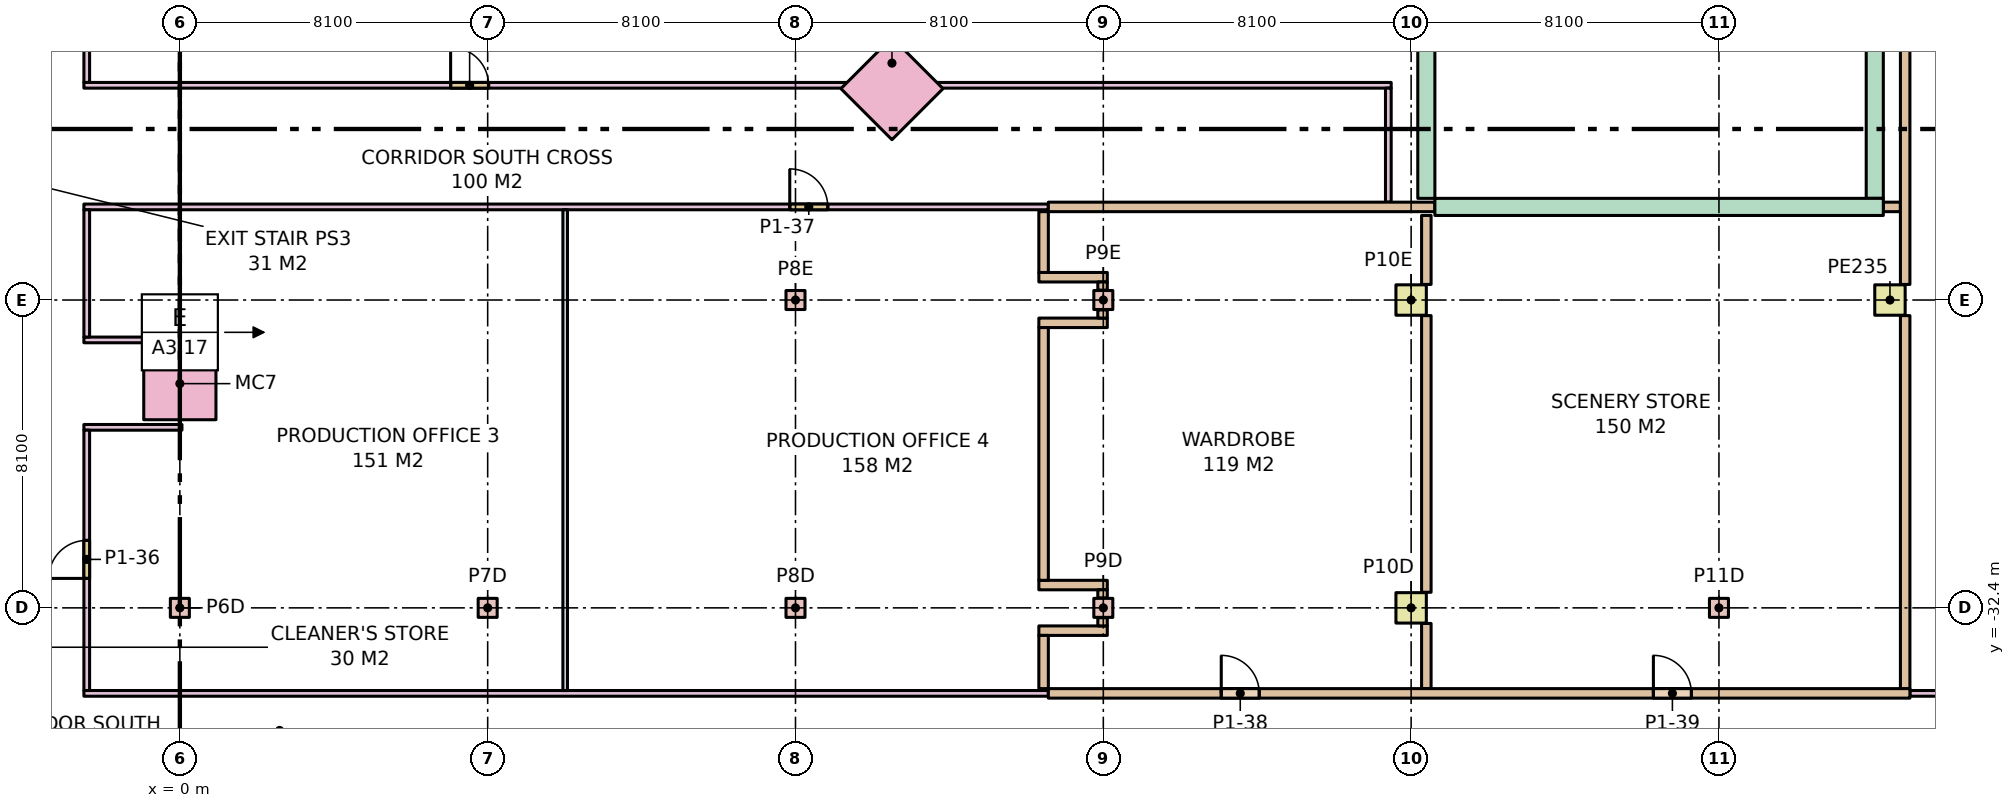
"""IFC4 building model, lengths in metres.
Left out: names, types, materials, properties, quantities, classifications, styles, units other than length and angle.
Written with IfcOpenShell. Run it as: python <this file> out.ifc"""

import sys

from ifc_helpers import new_model, si_unit, direction, frame, frame_2d, origin, origin_2d, place, context, subcontext, project, spatial, rectangle, extrude, element, fill, save


model = new_model("IFC4")
c1 = context("Model", 3, precision=1e-05, world=origin(), true_north=direction((0.0, 1.0)))
c2 = subcontext(c1, "Body", "Model", "MODEL_VIEW")
j1 = project(units=[si_unit("LENGTHUNIT", "METRE"), si_unit("PLANEANGLEUNIT", "RADIAN")], contexts=[c1])
p1 = place(None, origin())
s1 = spatial("IfcSite", under=j1, at=p1, CompositionType="ELEMENT")
p2 = place(p1, origin())
s2 = spatial("IfcBuilding", under=s1, at=p2, CompositionType="ELEMENT")
p3 = place(p2, frame((0.0, 0.0, 6.0)))
s3 = spatial("IfcBuildingStorey", under=s2, at=p3, CompositionType="ELEMENT", Elevation=6.0)
for number, where, z_axis, x_axis in (
    (1, (0.0, -32.4, 0.0), (0.0, 0.0, 1.0), (1.0, 0.0, 0.0)),
    (2, (8.1, -32.4, 0.0), (0.0, 0.0, 1.0), (1.0, 0.0, 0.0)),
    (3, (16.2, -32.4, 0.0), (0.0, 0.0, 1.0), (1.0, 0.0, 0.0)),
    (4, (16.2, -24.3, 0.0), (0.0, 0.0, 1.0), (1.0, 0.0, 0.0)),
    (5, (24.3, -32.4, 0.0), (0.0, 0.0, 1.0), (1.0, 0.0, 0.0)),
    (6, (24.3, -24.3, 0.0), (0.0, 0.0, 1.0), (1.0, 0.0, 0.0)),
):
    element("IfcColumn", number, at=place(p3, frame(where, z_axis=z_axis, x_axis=x_axis)), inside=s3, PredefinedType="COLUMN", context=c2, shape_type="SweptSolid", body=[
        extrude(rectangle(XDim=0.5, YDim=0.5, at=origin_2d()), origin(), (0.0, 0.0, 1.0), 7.0),
    ])
for number, where, z_axis, x_axis in (
    (7, (32.4, -32.4, 0.0), (0.0, 0.0, 1.0), (1.0, 0.0, 0.0)),
    (8, (32.4, -24.3, 0.0), (0.0, 0.0, 1.0), (1.0, 0.0, 0.0)),
):
    element("IfcColumn", number, at=place(p3, frame(where, z_axis=z_axis, x_axis=x_axis)), inside=s3, PredefinedType="COLUMN", context=c2, shape_type="SweptSolid", body=[
        extrude(rectangle(XDim=0.8, YDim=0.8, at=origin_2d()), origin(), (0.0, 0.0, 1.0), 7.0),
    ])
p4 = place(p3, frame((40.5, -32.4, 0.0), z_axis=(0.0, 0.0, 1.0), x_axis=(1.0, 0.0, 0.0)))
e9 = element("IfcColumn", 9, at=p4, inside=s3, PredefinedType="COLUMN", context=c2, shape_type="SweptSolid", body=[
    extrude(rectangle(XDim=0.5, YDim=0.5, at=origin_2d()), origin(), (0.0, 0.0, 1.0), 7.0),
])
p5 = place(p3, frame((45.0, -24.3, 0.0), z_axis=(0.0, 0.0, 1.0), x_axis=(1.0, 0.0, 0.0)))
e10 = element("IfcColumn", 10, at=p5, inside=s3, PredefinedType="COLUMN", context=c2, shape_type="SweptSolid", body=[
    extrude(rectangle(XDim=0.8, YDim=0.8, at=origin_2d()), origin(), (0.0, 0.0, 1.0), 7.0),
])
for number, where, z_axis, x_axis in (
    (11, (0.0, -26.5, 0.0), (0.0, 0.0, 1.0), (1.0, 0.0, 0.0)),
    (12, (18.738, -18.738, 0.0), (0.0, 0.0, 1.0), (0.707, 0.707, 0.0)),
):
    element("IfcColumn", number, at=place(p3, frame(where, z_axis=z_axis, x_axis=x_axis)), inside=s3, PredefinedType="COLUMN", context=c2, shape_type="SweptSolid", body=[
        extrude(rectangle(XDim=1.9, YDim=1.9, at=origin_2d()), origin(), (0.0, 0.0, 1.0), 7.0),
    ])
p6 = place(p3, frame((44.825, -21.85, 0.0), z_axis=(0.0, 0.0, 1.0), x_axis=(1.0, 0.0, 0.0)))
e13 = element("IfcWall", 13, at=p6, inside=s3, PredefinedType="PARTITIONING", context=c2, shape_type="SweptSolid", body=[
    extrude(rectangle(XDim=0.45, YDim=0.25, at=frame_2d((0.225, 0.0))), origin(), (0.0, 0.0, 1.0), 6.68),
])
p7 = place(p3, frame((44.6, -21.625, 0.0), z_axis=(0.0, 0.0, 1.0), x_axis=(0.0, 1.0, 0.0)))
e14 = element("IfcWall", 14, at=p7, inside=s3, PredefinedType="PARTITIONING", context=c2, shape_type="SweptSolid", body=[
    extrude(rectangle(XDim=5.015, YDim=0.45, at=frame_2d((2.507, 0.0))), origin(), (0.0, 0.0, 1.0), 6.68),
])
p8 = place(p3, frame((10.139, -34.575, 0.0), z_axis=(0.0, 0.0, 1.0), x_axis=(0.0, 1.0, 0.0)))
e15 = element("IfcWall", 15, at=p8, inside=s3, PredefinedType="PARTITIONING", context=c2, shape_type="SweptSolid", body=[
    extrude(rectangle(XDim=12.65, YDim=0.12, at=frame_2d((6.325, 0.0))), origin(), (0.0, 0.0, 1.0), 6.68),
])
p9 = place(p3, frame((-2.525, -21.85, 0.0), z_axis=(0.0, 0.0, 1.0), x_axis=(1.0, 0.0, 0.0)))
e16 = element("IfcWall", 16, at=p9, inside=s3, PredefinedType="PARTITIONING", context=c2, shape_type="SweptSolid", body=[
    extrude(rectangle(XDim=25.378, YDim=0.15, at=frame_2d((12.689, 0.0))), origin(), (0.0, 0.0, 1.0), 6.68),
])
p10 = place(p9, frame((18.574, 0.0, 0.0)))
e17 = element("IfcOpeningElement", 17, at=p10, cuts=e16, PredefinedType="OPENING", context=c2, shape_type="SweptSolid", body=[
    extrude(rectangle(XDim=1.0, YDim=2.1, at=frame_2d((0.5, 1.05))), frame((0.0, 0.085, 0.0), z_axis=(0.0, -1.0, 0.0), x_axis=(1.0, 0.0, 0.0)), (0.0, 0.0, 1.0), 0.17),
])
p11 = place(p3, frame((-2.525, -34.65, 0.0), z_axis=(0.0, 0.0, 1.0), x_axis=(1.0, 0.0, 0.0)))
e18 = element("IfcWall", 18, at=p11, inside=s3, PredefinedType="PARTITIONING", context=c2, shape_type="SweptSolid", body=[
    extrude(rectangle(XDim=25.378, YDim=0.15, at=frame_2d((12.689, 0.0))), origin(), (0.0, 0.0, 1.0), 6.68),
])
for number, where, z_axis, x_axis in (
    (19, (-2.525, -27.65, 0.0), (0.0, 0.0, 1.0), (1.0, 0.0, 0.0)),
    (20, (-2.525, -25.35, 0.0), (0.0, 0.0, 1.0), (1.0, 0.0, 0.0)),
):
    element("IfcWall", number, at=place(p3, frame(where, z_axis=z_axis, x_axis=x_axis)), inside=s3, PredefinedType="PARTITIONING", context=c2, shape_type="SweptSolid", body=[
        extrude(rectangle(XDim=2.58, YDim=0.15, at=frame_2d((1.29, 0.0))), origin(), (0.0, 0.0, 1.0), 6.68),
    ])
p12 = place(p3, frame((-2.45, -34.575, 0.0), z_axis=(0.0, 0.0, 1.0), x_axis=(0.0, 1.0, 0.0)))
e21 = element("IfcWall", 21, at=p12, inside=s3, PredefinedType="PARTITIONING", context=c2, shape_type="SweptSolid", body=[
    extrude(rectangle(XDim=6.85, YDim=0.15, at=frame_2d((3.425, 0.0))), origin(), (0.0, 0.0, 1.0), 6.68),
])
p13 = place(p12, frame((2.95, 0.0, 0.0)))
e22 = element("IfcOpeningElement", 22, at=p13, cuts=e21, PredefinedType="OPENING", context=c2, shape_type="SweptSolid", body=[
    extrude(rectangle(XDim=1.0, YDim=2.1, at=frame_2d((0.5, 1.05))), frame((0.0, 0.085, 0.0), z_axis=(0.0, -1.0, 0.0), x_axis=(1.0, 0.0, 0.0)), (0.0, 0.0, 1.0), 0.17),
])
p14 = place(p3, frame((-2.45, -25.275, 0.0), z_axis=(0.0, 0.0, 1.0), x_axis=(0.0, 1.0, 0.0)))
e23 = element("IfcWall", 23, at=p14, inside=s3, PredefinedType="PARTITIONING", context=c2, shape_type="SweptSolid", body=[
    extrude(rectangle(XDim=3.35, YDim=0.15, at=frame_2d((1.675, 0.0))), origin(), (0.0, 0.0, 1.0), 6.68),
])
for number, where, z_axis, x_axis in (
    (24, (22.604, -33.0, 0.0), (0.0, 0.0, 1.0), (1.0, 0.0, 0.0)),
    (25, (22.604, -31.8, 0.0), (0.0, 0.0, 1.0), (1.0, 0.0, 0.0)),
    (26, (22.604, -24.9, 0.0), (0.0, 0.0, 1.0), (1.0, 0.0, 0.0)),
    (27, (22.604, -23.7, 0.0), (0.0, 0.0, 1.0), (1.0, 0.0, 0.0)),
):
    element("IfcWall", number, at=place(p3, frame(where, z_axis=z_axis, x_axis=x_axis)), inside=s3, PredefinedType="PARTITIONING", context=c2, shape_type="SweptSolid", body=[
        extrude(rectangle(XDim=1.802, YDim=0.25, at=frame_2d((0.901, 0.0))), origin(), (0.0, 0.0, 1.0), 6.68),
    ])
p15 = place(p3, frame((22.729, -34.525, 0.0), z_axis=(0.0, 0.0, 1.0), x_axis=(0.0, 1.0, 0.0)))
e28 = element("IfcWall", 28, at=p15, inside=s3, PredefinedType="PARTITIONING", context=c2, shape_type="SweptSolid", body=[
    extrude(rectangle(XDim=1.4, YDim=0.25, at=frame_2d((0.7, 0.0))), origin(), (0.0, 0.0, 1.0), 6.68),
])
p16 = place(p3, frame((22.729, -31.675, 0.0), z_axis=(0.0, 0.0, 1.0), x_axis=(0.0, 1.0, 0.0)))
e29 = element("IfcWall", 29, at=p16, inside=s3, PredefinedType="PARTITIONING", context=c2, shape_type="SweptSolid", body=[
    extrude(rectangle(XDim=6.65, YDim=0.25, at=frame_2d((3.325, 0.0))), origin(), (0.0, 0.0, 1.0), 6.68),
])
p17 = place(p3, frame((22.729, -23.575, 0.0), z_axis=(0.0, 0.0, 1.0), x_axis=(0.0, 1.0, 0.0)))
e30 = element("IfcWall", 30, at=p17, inside=s3, PredefinedType="PARTITIONING", context=c2, shape_type="SweptSolid", body=[
    extrude(rectangle(XDim=1.6, YDim=0.25, at=frame_2d((0.8, 0.0))), origin(), (0.0, 0.0, 1.0), 6.68),
])
p18 = place(p3, frame((24.28, -32.875, 0.0), z_axis=(0.0, 0.0, 1.0), x_axis=(0.0, 1.0, 0.0)))
e31 = element("IfcWall", 31, at=p18, inside=s3, PredefinedType="PARTITIONING", context=c2, shape_type="SweptSolid", body=[
    extrude(rectangle(XDim=0.215, YDim=0.25, at=frame_2d((0.107, 0.0))), origin(), (0.0, 0.0, 1.0), 6.68),
])
for number, where, z_axis, x_axis in (
    (32, (24.28, -32.14, 0.0), (0.0, 0.0, 1.0), (0.0, 1.0, 0.0)),
    (33, (24.28, -24.775, 0.0), (0.0, 0.0, 1.0), (0.0, 1.0, 0.0)),
):
    element("IfcWall", number, at=place(p3, frame(where, z_axis=z_axis, x_axis=x_axis)), inside=s3, PredefinedType="PARTITIONING", context=c2, shape_type="SweptSolid", body=[
        extrude(rectangle(XDim=0.215, YDim=0.25, at=frame_2d((0.107, 0.0))), origin(), (0.0, 0.0, 1.0), 6.68),
    ])
p19 = place(p3, frame((24.28, -24.04, 0.0), z_axis=(0.0, 0.0, 1.0), x_axis=(0.0, 1.0, 0.0)))
e34 = element("IfcWall", 34, at=p19, inside=s3, PredefinedType="PARTITIONING", context=c2, shape_type="SweptSolid", body=[
    extrude(rectangle(XDim=0.215, YDim=0.25, at=frame_2d((0.107, 0.0))), origin(), (0.0, 0.0, 1.0), 6.68),
])
p20 = place(p3, frame((-2.525, -18.65, 0.0), z_axis=(0.0, 0.0, 1.0), x_axis=(1.0, 0.0, 0.0)))
e35 = element("IfcWall", 35, at=p20, inside=s3, PredefinedType="PARTITIONING", context=c2, shape_type="SweptSolid", body=[
    extrude(rectangle(XDim=20.303, YDim=0.15, at=frame_2d((10.152, 0.0))), origin(), (0.0, 0.0, 1.0), 6.68),
])
p21 = place(p20, frame((9.65, 0.0, 0.0)))
e36 = element("IfcOpeningElement", 36, at=p21, cuts=e35, PredefinedType="OPENING", context=c2, shape_type="SweptSolid", body=[
    extrude(rectangle(XDim=1.0, YDim=2.1, at=frame_2d((0.5, 1.05))), frame((0.0, 0.085, 0.0), z_axis=(0.0, -1.0, 0.0), x_axis=(1.0, 0.0, 0.0)), (0.0, 0.0, 1.0), 0.17),
])
p22 = place(p3, frame((19.698, -18.65, 0.0), z_axis=(0.0, 0.0, 1.0), x_axis=(1.0, 0.0, 0.0)))
e37 = element("IfcWall", 37, at=p22, inside=s3, PredefinedType="PARTITIONING", context=c2, shape_type="SweptSolid", body=[
    extrude(rectangle(XDim=12.177, YDim=0.15, at=frame_2d((6.088, 0.0))), origin(), (0.0, 0.0, 1.0), 6.68),
])
p23 = place(p3, frame((31.8, -21.725, 0.0), z_axis=(0.0, 0.0, 1.0), x_axis=(0.0, 1.0, 0.0)))
e38 = element("IfcWall", 38, at=p23, inside=s3, PredefinedType="PARTITIONING", context=c2, shape_type="SweptSolid", body=[
    extrude(rectangle(XDim=3.0, YDim=0.15, at=frame_2d((1.5, 0.0))), origin(), (0.0, 0.0, 1.0), 6.68),
])
p24 = place(p3, frame((22.854, -21.85, 0.0), z_axis=(0.0, 0.0, 1.0), x_axis=(1.0, 0.0, 0.0)))
e39 = element("IfcWall", 39, at=p24, inside=s3, PredefinedType="PARTITIONING", context=c2, shape_type="SweptSolid", body=[
    extrude(rectangle(XDim=10.171, YDim=0.25, at=frame_2d((5.086, 0.0))), origin(), (0.0, 0.0, 1.0), 6.68),
])
p25 = place(p3, frame((33.025, -21.85, 0.0), z_axis=(0.0, 0.0, 1.0), x_axis=(1.0, 0.0, 0.0)))
e40 = element("IfcWall", 40, at=p25, inside=s3, PredefinedType="PARTITIONING", context=c2, shape_type="SweptSolid", body=[
    extrude(rectangle(XDim=11.8, YDim=0.45, at=frame_2d((5.9, 0.0))), origin(), (0.0, 0.0, 1.0), 6.68),
])
p26 = place(p3, frame((32.8, -34.525, 0.0), z_axis=(0.0, 0.0, 1.0), x_axis=(0.0, 1.0, 0.0)))
e41 = element("IfcWall", 41, at=p26, inside=s3, PredefinedType="PARTITIONING", context=c2, shape_type="SweptSolid", body=[
    extrude(rectangle(XDim=1.715, YDim=0.25, at=frame_2d((0.857, 0.0))), origin(), (0.0, 0.0, 1.0), 6.68),
])
p27 = place(p3, frame((32.8, -31.99, 0.0), z_axis=(0.0, 0.0, 1.0), x_axis=(0.0, 1.0, 0.0)))
e42 = element("IfcWall", 42, at=p27, inside=s3, PredefinedType="PARTITIONING", context=c2, shape_type="SweptSolid", body=[
    extrude(rectangle(XDim=7.28, YDim=0.25, at=frame_2d((3.64, 0.0))), origin(), (0.0, 0.0, 1.0), 6.68),
])
p28 = place(p3, frame((32.8, -23.89, 0.0), z_axis=(0.0, 0.0, 1.0), x_axis=(0.0, 1.0, 0.0)))
e43 = element("IfcWall", 43, at=p28, inside=s3, PredefinedType="PARTITIONING", context=c2, shape_type="SweptSolid", body=[
    extrude(rectangle(XDim=1.815, YDim=0.25, at=frame_2d((0.907, 0.0))), origin(), (0.0, 0.0, 1.0), 6.68),
])
p29 = place(p3, frame((45.4, -34.525, 0.0), z_axis=(0.0, 0.0, 1.0), x_axis=(0.0, 1.0, 0.0)))
e44 = element("IfcWall", 44, at=p29, inside=s3, PredefinedType="PARTITIONING", context=c2, shape_type="SweptSolid", body=[
    extrude(rectangle(XDim=9.815, YDim=0.25, at=frame_2d((4.907, 0.0))), origin(), (0.0, 0.0, 1.0), 6.68),
])
p30 = place(p3, frame((45.4, -23.89, 0.0), z_axis=(0.0, 0.0, 1.0), x_axis=(0.0, 1.0, 0.0)))
e45 = element("IfcWall", 45, at=p30, inside=s3, PredefinedType="PARTITIONING", context=c2, shape_type="SweptSolid", body=[
    extrude(rectangle(XDim=7.28, YDim=0.25, at=frame_2d((3.64, 0.0))), origin(), (0.0, 0.0, 1.0), 6.68),
])
p31 = place(p3, frame((22.854, -34.65, 0.0), z_axis=(0.0, 0.0, 1.0), x_axis=(1.0, 0.0, 0.0)))
e46 = element("IfcWall", 46, at=p31, inside=s3, PredefinedType="PARTITIONING", context=c2, shape_type="SweptSolid", body=[
    extrude(rectangle(XDim=22.671, YDim=0.25, at=frame_2d((11.336, 0.0))), origin(), (0.0, 0.0, 1.0), 6.68),
])
p32 = place(p31, frame((4.55, 0.0, 0.0)))
e47 = element("IfcOpeningElement", 47, at=p32, cuts=e46, PredefinedType="OPENING", context=c2, shape_type="SweptSolid", body=[
    extrude(rectangle(XDim=1.0, YDim=2.1, at=frame_2d((0.5, 1.05))), frame((0.0, 0.135, 0.0), z_axis=(0.0, -1.0, 0.0), x_axis=(1.0, 0.0, 0.0)), (0.0, 0.0, 1.0), 0.27),
])
p33 = place(p31, frame((15.921, 0.0, 0.0)))
e48 = element("IfcOpeningElement", 48, at=p33, cuts=e46, PredefinedType="OPENING", context=c2, shape_type="SweptSolid", body=[
    extrude(rectangle(XDim=1.0, YDim=2.1, at=frame_2d((0.5, 1.05))), frame((0.0, 0.135, 0.0), z_axis=(0.0, -1.0, 0.0), x_axis=(1.0, 0.0, 0.0)), (0.0, 0.0, 1.0), 0.27),
])
p34 = place(p3, frame((45.525, -34.65, 0.0), z_axis=(0.0, 0.0, 1.0), x_axis=(1.0, 0.0, 0.0)))
e49 = element("IfcWall", 49, at=p34, inside=s3, PredefinedType="PARTITIONING", context=c2, shape_type="SweptSolid", body=[
    extrude(rectangle(XDim=13.755, YDim=0.15, at=frame_2d((6.877, 0.0))), origin(), (0.0, 0.0, 1.0), 6.68),
])
p35 = place(p34, frame((3.55, 0.0, 0.0)))
e50 = element("IfcOpeningElement", 50, at=p35, cuts=e49, PredefinedType="OPENING", context=c2, shape_type="SweptSolid", body=[
    extrude(rectangle(XDim=1.0, YDim=2.1, at=frame_2d((0.5, 1.05))), frame((0.0, 0.085, 0.0), z_axis=(0.0, -1.0, 0.0), x_axis=(1.0, 0.0, 0.0)), (0.0, 0.0, 1.0), 0.17),
])
p36 = place(p34, frame((10.435, 0.0, 0.0)))
e51 = element("IfcOpeningElement", 51, at=p36, cuts=e49, PredefinedType="OPENING", context=c2, shape_type="SweptSolid", body=[
    extrude(rectangle(XDim=1.0, YDim=2.1, at=frame_2d((0.5, 1.05))), frame((0.0, 0.085, 0.0), z_axis=(0.0, -1.0, 0.0), x_axis=(1.0, 0.0, 0.0)), (0.0, 0.0, 1.0), 0.17),
])
p37 = place(p3, frame((-2.45, -18.575, 0.0), z_axis=(0.0, 0.0, 1.0), x_axis=(0.0, 1.0, 0.0)))
e52 = element("IfcWall", 52, at=p37, inside=s3, PredefinedType="PARTITIONING", context=c2, shape_type="SweptSolid", body=[
    extrude(rectangle(XDim=7.1, YDim=0.15, at=frame_2d((3.55, 0.0))), origin(), (0.0, 0.0, 1.0), 6.68),
])
p38 = place(p3, frame((32.8, -21.625, 0.0), z_axis=(0.0, 0.0, 1.0), x_axis=(0.0, 1.0, 0.0)))
e53 = element("IfcWall", 53, at=p38, inside=s3, PredefinedType="PARTITIONING", context=c2, shape_type="SweptSolid", body=[
    extrude(rectangle(XDim=5.015, YDim=0.45, at=frame_2d((2.507, 0.0))), origin(), (0.0, 0.0, 1.0), 6.68),
])
p39 = place(p21, origin())
e54 = element("IfcDoor", 54, at=p39, inside=s3, OperationType="SINGLE_SWING_LEFT", PredefinedType="DOOR", context=c2, shape_type="SweptSolid", body=[
    extrude(rectangle(XDim=1.0, YDim=2.1, at=frame_2d((0.5, 1.05))), frame((0.0, 0.025, 0.0), z_axis=(0.0, -1.0, 0.0), x_axis=(1.0, 0.0, 0.0)), (0.0, 0.0, 1.0), 0.05),
])
fill(e36, e54)
p40 = place(p13, origin())
e55 = element("IfcDoor", 55, at=p40, inside=s3, OperationType="SINGLE_SWING_LEFT", PredefinedType="DOOR", context=c2, shape_type="SweptSolid", body=[
    extrude(rectangle(XDim=1.0, YDim=2.1, at=frame_2d((0.5, 1.05))), frame((0.0, 0.025, 0.0), z_axis=(0.0, -1.0, 0.0), x_axis=(1.0, 0.0, 0.0)), (0.0, 0.0, 1.0), 0.05),
])
fill(e22, e55)
p41 = place(p10, origin())
e56 = element("IfcDoor", 56, at=p41, inside=s3, OperationType="SINGLE_SWING_LEFT", PredefinedType="DOOR", context=c2, shape_type="SweptSolid", body=[
    extrude(rectangle(XDim=1.0, YDim=2.1, at=frame_2d((0.5, 1.05))), frame((0.0, 0.025, 0.0), z_axis=(0.0, -1.0, 0.0), x_axis=(1.0, 0.0, 0.0)), (0.0, 0.0, 1.0), 0.05),
])
fill(e17, e56)
p42 = place(p32, origin())
e57 = element("IfcDoor", 57, at=p42, inside=s3, OperationType="SINGLE_SWING_LEFT", PredefinedType="DOOR", context=c2, shape_type="SweptSolid", body=[
    extrude(rectangle(XDim=1.0, YDim=2.1, at=frame_2d((0.5, 1.05))), frame((0.0, 0.025, 0.0), z_axis=(0.0, -1.0, 0.0), x_axis=(1.0, 0.0, 0.0)), (0.0, 0.0, 1.0), 0.05),
])
fill(e47, e57)
p43 = place(p33, origin())
e58 = element("IfcDoor", 58, at=p43, inside=s3, OperationType="SINGLE_SWING_LEFT", PredefinedType="DOOR", context=c2, shape_type="SweptSolid", body=[
    extrude(rectangle(XDim=1.0, YDim=2.1, at=frame_2d((0.5, 1.05))), frame((0.0, 0.025, 0.0), z_axis=(0.0, -1.0, 0.0), x_axis=(1.0, 0.0, 0.0)), (0.0, 0.0, 1.0), 0.05),
])
fill(e48, e58)
save(model, sys.argv[1])
